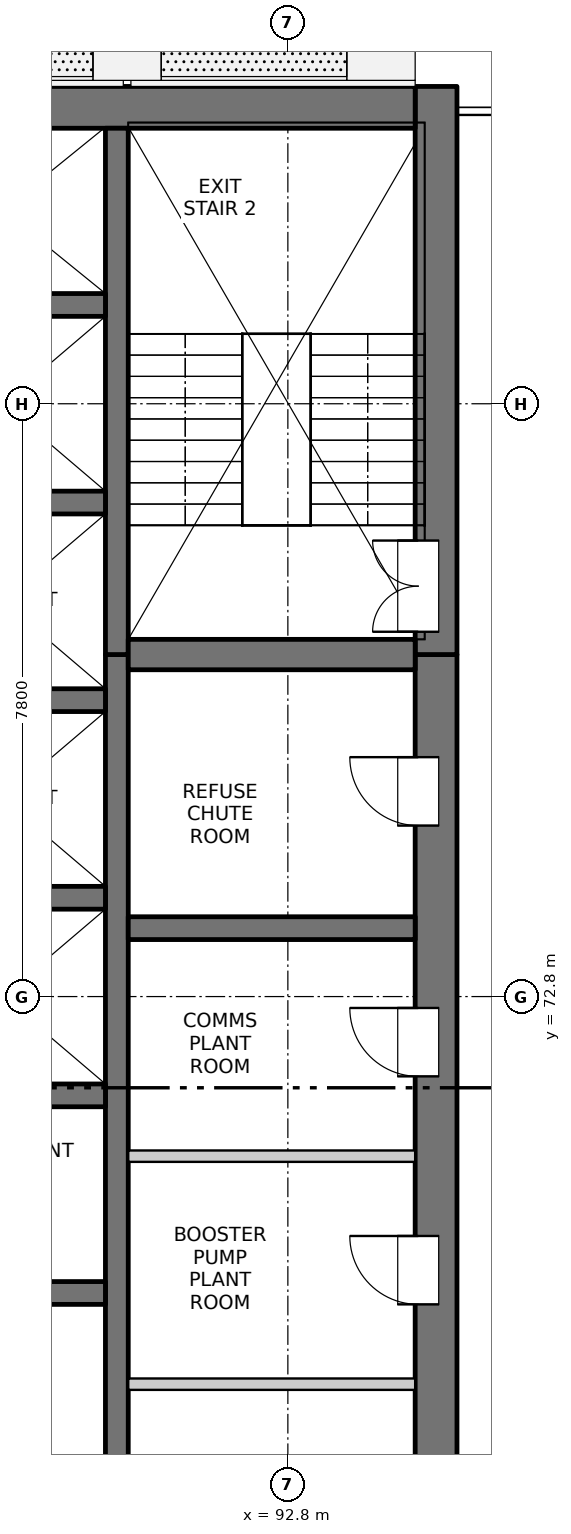
"""IFC4 building model, lengths in metres.
Left out: names, types, materials, properties, quantities, classifications, styles, units other than length and angle.
Written with IfcOpenShell. Run it as: python <this file> out.ifc"""

import sys

from ifc_helpers import new_model, si_unit, direction, frame, frame_2d, origin, place, context, subcontext, project, spatial, rectangle, extrude, element, fill, save


model = new_model("IFC4")
c1 = context("Model", 3, precision=1e-05, world=origin(), true_north=direction((0.0, 1.0)))
c2 = subcontext(c1, "Body", "Model", "MODEL_VIEW")
j1 = project(units=[si_unit("LENGTHUNIT", "METRE"), si_unit("PLANEANGLEUNIT", "RADIAN")], contexts=[c1])
p1 = place(None, origin())
s1 = spatial("IfcSite", under=j1, at=p1, CompositionType="ELEMENT")
p2 = place(p1, origin())
s2 = spatial("IfcBuilding", under=s1, at=p2, CompositionType="ELEMENT")
p3 = place(p2, frame((0.0, 0.0, 172.4)))
s3 = spatial("IfcBuildingStorey", under=s2, at=p3, CompositionType="ELEMENT", Elevation=172.4)
p4 = place(p3, frame((94.75, 61.95, -0.3), z_axis=(0.0, 0.0, 1.0), x_axis=(0.0, 1.0, 0.0)))
e1 = element("IfcWall", 1, at=p4, inside=s3, PredefinedType="SOLIDWALL", context=c2, shape_type="SweptSolid", body=[
    extrude(rectangle(XDim=15.35, YDim=0.55, at=frame_2d((7.675, 0.0))), origin(), (0.0, 0.0, 1.0), 6.8),
])
p5 = place(p4, frame((0.925, 0.0, 0.3)))
e2 = element("IfcOpeningElement", 2, at=p5, cuts=e1, PredefinedType="OPENING", context=c2, shape_type="SweptSolid", body=[
    extrude(rectangle(XDim=0.9, YDim=2.1, at=frame_2d((0.45, 1.05))), frame((0.0, 0.285, 0.0), z_axis=(0.0, -1.0, 0.0), x_axis=(1.0, 0.0, 0.0)), (0.0, 0.0, 1.0), 0.57),
])
p6 = place(p4, frame((3.8, 0.0, 0.3)))
e3 = element("IfcOpeningElement", 3, at=p6, cuts=e1, PredefinedType="OPENING", context=c2, shape_type="SweptSolid", body=[
    extrude(rectangle(XDim=0.9, YDim=2.1, at=frame_2d((0.45, 1.05))), frame((0.0, 0.285, 0.0), z_axis=(0.0, -1.0, 0.0), x_axis=(1.0, 0.0, 0.0)), (0.0, 0.0, 1.0), 0.57),
])
p7 = place(p4, frame((6.8, 0.0, 0.3)))
e4 = element("IfcOpeningElement", 4, at=p7, cuts=e1, PredefinedType="OPENING", context=c2, shape_type="SweptSolid", body=[
    extrude(rectangle(XDim=0.9, YDim=2.1, at=frame_2d((0.45, 1.05))), frame((0.0, 0.285, 0.0), z_axis=(0.0, -1.0, 0.0), x_axis=(1.0, 0.0, 0.0)), (0.0, 0.0, 1.0), 0.57),
])
p8 = place(p4, frame((9.8, 0.0, 0.3)))
e5 = element("IfcOpeningElement", 5, at=p8, cuts=e1, PredefinedType="OPENING", context=c2, shape_type="SweptSolid", body=[
    extrude(rectangle(XDim=0.9, YDim=2.1, at=frame_2d((0.45, 1.05))), frame((0.0, 0.285, 0.0), z_axis=(0.0, -1.0, 0.0), x_axis=(1.0, 0.0, 0.0)), (0.0, 0.0, 1.0), 0.57),
])
p9 = place(p4, frame((13.1, 0.0, 0.3)))
e6 = element("IfcOpeningElement", 6, at=p9, cuts=e1, PredefinedType="OPENING", context=c2, shape_type="SweptSolid", body=[
    extrude(rectangle(XDim=0.9, YDim=2.1, at=frame_2d((0.45, 1.05))), frame((0.0, 0.285, 0.0), z_axis=(0.0, -1.0, 0.0), x_axis=(1.0, 0.0, 0.0)), (0.0, 0.0, 1.0), 0.57),
])
p10 = place(p3, frame((94.75, 77.3, -0.3), z_axis=(0.0, 0.0, 1.0), x_axis=(0.0, 1.0, 0.0)))
e7 = element("IfcWall", 7, at=p10, inside=s3, PredefinedType="SOLIDWALL", context=c2, shape_type="SweptSolid", body=[
    extrude(rectangle(XDim=7.475, YDim=0.55, at=frame_2d((3.737, 0.0))), origin(), (0.0, 0.0, 1.0), 6.8),
])
p11 = place(p10, frame((0.3, 0.0, 0.3)))
e8 = element("IfcOpeningElement", 8, at=p11, cuts=e7, PredefinedType="OPENING", context=c2, shape_type="SweptSolid", body=[
    extrude(rectangle(XDim=1.2, YDim=2.1, at=frame_2d((0.6, 1.05))), frame((0.0, 0.285, 0.0), z_axis=(0.0, -1.0, 0.0), x_axis=(1.0, 0.0, 0.0)), (0.0, 0.0, 1.0), 0.57),
])
p12 = place(p3, frame((75.525, 84.5, -0.3), z_axis=(0.0, 0.0, 1.0), x_axis=(1.0, 0.0, 0.0)))
e9 = element("IfcWall", 9, at=p12, inside=s3, PredefinedType="SOLIDWALL", context=c2, shape_type="SweptSolid", body=[
    extrude(rectangle(XDim=18.95, YDim=0.55, at=frame_2d((9.475, 0.0))), origin(), (0.0, 0.0, 1.0), 6.8),
])
p13 = place(p3, frame((90.55, 61.95, -0.3), z_axis=(0.0, 0.0, 1.0), x_axis=(0.0, 1.0, 0.0)))
e10 = element("IfcWall", 10, at=p13, inside=s3, PredefinedType="SOLIDWALL", context=c2, shape_type="SweptSolid", body=[
    extrude(rectangle(XDim=15.35, YDim=0.3, at=frame_2d((7.675, 0.0))), origin(), (0.0, 0.0, 1.0), 6.8),
])
p14 = place(p3, frame((90.55, 77.3, -0.3), z_axis=(0.0, 0.0, 1.0), x_axis=(0.0, 1.0, 0.0)))
e11 = element("IfcWall", 11, at=p14, inside=s3, PredefinedType="SOLIDWALL", context=c2, shape_type="SweptSolid", body=[
    extrude(rectangle(XDim=6.925, YDim=0.3, at=frame_2d((3.462, 0.0))), origin(), (0.0, 0.0, 1.0), 6.8),
])
for number, where, z_axis, x_axis in (
    (12, (87.4, 68.9, -0.3), (0.0, 0.0, 1.0), (1.0, 0.0, 0.0)),
    (13, (87.4, 71.5, -0.3), (0.0, 0.0, 1.0), (1.0, 0.0, 0.0)),
    (14, (87.4, 74.1, -0.3), (0.0, 0.0, 1.0), (1.0, 0.0, 0.0)),
    (15, (87.4, 76.7, -0.3), (0.0, 0.0, 1.0), (1.0, 0.0, 0.0)),
    (16, (87.4, 79.3, -0.3), (0.0, 0.0, 1.0), (1.0, 0.0, 0.0)),
    (17, (87.4, 81.9, -0.3), (0.0, 0.0, 1.0), (1.0, 0.0, 0.0)),
):
    element("IfcWall", number, at=place(p3, frame(where, z_axis=z_axis, x_axis=x_axis)), inside=s3, PredefinedType="SOLIDWALL", context=c2, shape_type="SweptSolid", body=[
        extrude(rectangle(XDim=3.0, YDim=0.3, at=frame_2d((1.5, 0.0))), origin(), (0.0, 0.0, 1.0), 6.8),
    ])
p15 = place(p3, frame((90.7, 73.7, -0.3), z_axis=(0.0, 0.0, 1.0), x_axis=(1.0, 0.0, 0.0)))
e18 = element("IfcWall", 18, at=p15, inside=s3, PredefinedType="SOLIDWALL", context=c2, shape_type="SweptSolid", body=[
    extrude(rectangle(XDim=3.775, YDim=0.3, at=frame_2d((1.888, 0.0))), origin(), (0.0, 0.0, 1.0), 6.8),
])
p16 = place(p3, frame((90.7, 77.3, -0.3), z_axis=(0.0, 0.0, 1.0), x_axis=(1.0, 0.0, 0.0)))
e19 = element("IfcWall", 19, at=p16, inside=s3, PredefinedType="SOLIDWALL", context=c2, shape_type="SweptSolid", body=[
    extrude(rectangle(XDim=3.775, YDim=0.4, at=frame_2d((1.888, 0.0))), origin(), (0.0, 0.0, 1.0), 6.8),
])
for number, where, z_axis, x_axis in (
    (20, (90.7, 67.7, 0.0), (0.0, 0.0, 1.0), (1.0, 0.0, 0.0)),
    (21, (90.7, 70.7, 0.0), (0.0, 0.0, 1.0), (1.0, 0.0, 0.0)),
):
    element("IfcWall", number, at=place(p3, frame(where, z_axis=z_axis, x_axis=x_axis)), inside=s3, PredefinedType="PARTITIONING", context=c2, shape_type="SweptSolid", body=[
        extrude(rectangle(XDim=3.775, YDim=0.15, at=frame_2d((1.887, 0.0))), origin(), (0.0, 0.0, 1.0), 6.5),
    ])
p17 = place(p7, origin())
e22 = element("IfcDoor", 22, at=p17, inside=s3, OperationType="SINGLE_SWING_RIGHT", PredefinedType="DOOR", context=c2, shape_type="SweptSolid", body=[
    extrude(rectangle(XDim=0.9, YDim=2.1, at=frame_2d((0.45, 1.05))), frame((0.0, 0.26, 0.0), z_axis=(0.0, -1.0, 0.0), x_axis=(1.0, 0.0, 0.0)), (0.0, 0.0, 1.0), 0.05),
])
fill(e4, e22)
p18 = place(p8, origin())
e23 = element("IfcDoor", 23, at=p18, inside=s3, OperationType="SINGLE_SWING_RIGHT", PredefinedType="DOOR", context=c2, shape_type="SweptSolid", body=[
    extrude(rectangle(XDim=0.9, YDim=2.1, at=frame_2d((0.45, 1.05))), frame((0.0, 0.26, 0.0), z_axis=(0.0, -1.0, 0.0), x_axis=(1.0, 0.0, 0.0)), (0.0, 0.0, 1.0), 0.05),
])
fill(e5, e23)
p19 = place(p9, origin())
e24 = element("IfcDoor", 24, at=p19, inside=s3, OperationType="SINGLE_SWING_RIGHT", PredefinedType="DOOR", context=c2, shape_type="SweptSolid", body=[
    extrude(rectangle(XDim=0.9, YDim=2.1, at=frame_2d((0.45, 1.05))), frame((0.0, 0.26, 0.0), z_axis=(0.0, -1.0, 0.0), x_axis=(1.0, 0.0, 0.0)), (0.0, 0.0, 1.0), 0.05),
])
fill(e6, e24)
p20 = place(p11, origin())
e25 = element("IfcDoor", 25, at=p20, inside=s3, OperationType="DOUBLE_DOOR_SINGLE_SWING", PredefinedType="DOOR", context=c2, shape_type="SweptSolid", body=[
    extrude(rectangle(XDim=1.2, YDim=2.1, at=frame_2d((0.6, 1.05))), frame((0.0, 0.26, 0.0), z_axis=(0.0, -1.0, 0.0), x_axis=(1.0, 0.0, 0.0)), (0.0, 0.0, 1.0), 0.05),
])
fill(e8, e25)
save(model, sys.argv[1])
